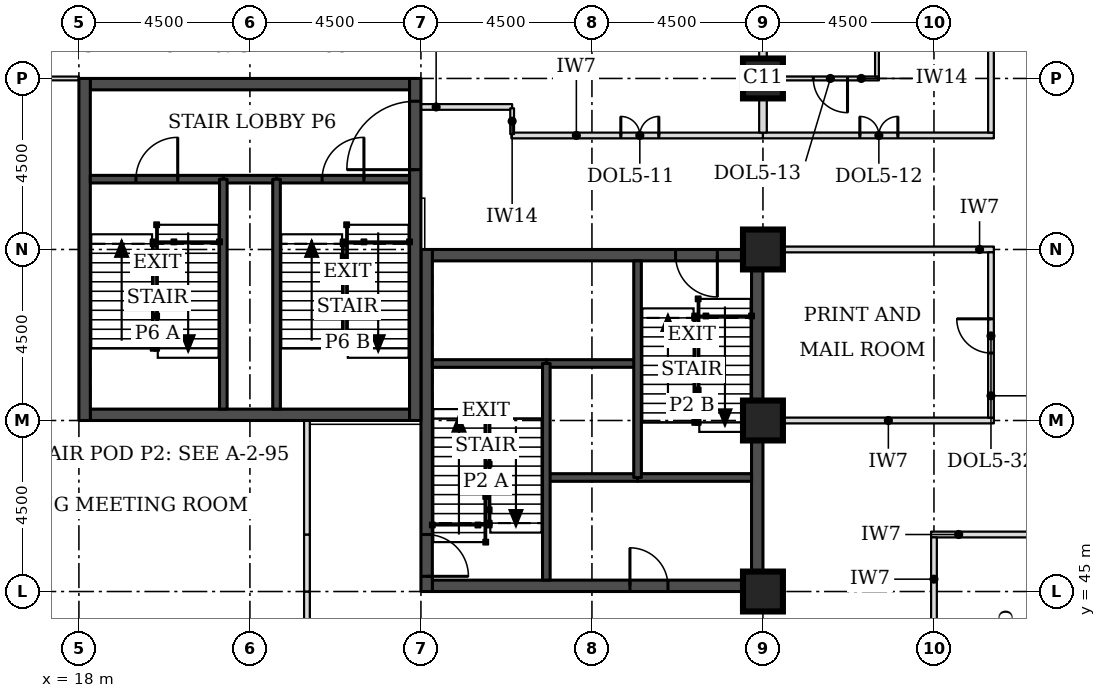
"""IFC4 building model, lengths in metres.
Left out: names, types, materials, properties, quantities, classifications, styles, units other than length and angle.
Written with IfcOpenShell. Run it as: python <this file> out.ifc"""

import sys

from ifc_helpers import new_model, si_unit, direction, frame, frame_2d, origin, origin_2d, place, context, subcontext, project, spatial, rectangle, extrude, element, fill, save


model = new_model("IFC4")
c1 = context("Model", 3, precision=1e-05, world=origin(), true_north=direction((0.0, 1.0)))
c2 = subcontext(c1, "Body", "Model", "MODEL_VIEW")
j1 = project(units=[si_unit("LENGTHUNIT", "METRE"), si_unit("PLANEANGLEUNIT", "RADIAN")], contexts=[c1])
p1 = place(None, origin())
s1 = spatial("IfcSite", under=j1, at=p1, CompositionType="ELEMENT")
p2 = place(p1, origin())
s2 = spatial("IfcBuilding", under=s1, at=p2, CompositionType="ELEMENT")
p3 = place(p2, frame((0.0, 0.0, 112.2)))
s3 = spatial("IfcBuildingStorey", under=s2, at=p3, CompositionType="ELEMENT", Elevation=112.2)
for number, where, z_axis, x_axis in (
    (1, (36.0, 45.0, 0.0), (0.0, 0.0, 1.0), (1.0, 0.0, 0.0)),
    (2, (36.0, 49.5, 0.0), (0.0, 0.0, 1.0), (1.0, 0.0, 0.0)),
    (3, (36.0, 54.0, 0.0), (0.0, 0.0, 1.0), (1.0, 0.0, 0.0)),
    (4, (36.0, 58.5, 0.0), (0.0, 0.0, 1.0), (1.0, 0.0, 0.0)),
):
    element("IfcColumn", number, at=place(p3, frame(where, z_axis=z_axis, x_axis=x_axis)), inside=s3, PredefinedType="COLUMN", context=c2, shape_type="SweptSolid", body=[
        extrude(rectangle(XDim=1.05, YDim=1.05, at=origin_2d()), origin(), (0.0, 0.0, 1.0), 3.7),
    ])
p4 = place(p3, frame((27.3, 45.15, 0.0), z_axis=(0.0, 0.0, 1.0), x_axis=(1.0, 0.0, 0.0)))
e5 = element("IfcWall", 5, at=p4, inside=s3, PredefinedType="SHEAR", context=c2, shape_type="SweptSolid", body=[
    extrude(rectangle(XDim=8.4, YDim=0.3, at=frame_2d((4.2, 0.0))), origin(), (0.0, 0.0, 1.0), 3.7),
])
p5 = place(p4, frame((5.2, 0.0, 0.0)))
e6 = element("IfcOpeningElement", 6, at=p5, cuts=e5, PredefinedType="OPENING", context=c2, shape_type="SweptSolid", body=[
    extrude(rectangle(XDim=1.0, YDim=2.1, at=frame_2d((0.5, 1.05))), frame((0.0, 0.16, 0.0), z_axis=(0.0, -1.0, 0.0), x_axis=(1.0, 0.0, 0.0)), (0.0, 0.0, 1.0), 0.32),
])
p6 = place(p3, frame((27.3, 53.85, 0.0), z_axis=(0.0, 0.0, 1.0), x_axis=(1.0, 0.0, 0.0)))
e7 = element("IfcWall", 7, at=p6, inside=s3, PredefinedType="SHEAR", context=c2, shape_type="SweptSolid", body=[
    extrude(rectangle(XDim=8.4, YDim=0.3, at=frame_2d((4.2, 0.0))), origin(), (0.0, 0.0, 1.0), 3.7),
])
p7 = place(p6, frame((6.4, 0.0, 0.0)))
e8 = element("IfcOpeningElement", 8, at=p7, cuts=e7, PredefinedType="OPENING", context=c2, shape_type="SweptSolid", body=[
    extrude(rectangle(XDim=1.1, YDim=2.1, at=frame_2d((0.55, 1.05))), frame((0.0, 0.16, 0.0), z_axis=(0.0, -1.0, 0.0), x_axis=(1.0, 0.0, 0.0)), (0.0, 0.0, 1.0), 0.32),
])
p8 = place(p3, frame((27.15, 45.0, 0.0), z_axis=(0.0, 0.0, 1.0), x_axis=(0.0, 1.0, 0.0)))
e9 = element("IfcWall", 9, at=p8, inside=s3, PredefinedType="SHEAR", context=c2, shape_type="SweptSolid", body=[
    extrude(rectangle(XDim=9.0, YDim=0.3, at=frame_2d((4.5, 0.0))), origin(), (0.0, 0.0, 1.0), 3.7),
])
p9 = place(p8, frame((0.4, 0.0, 0.0)))
e10 = element("IfcOpeningElement", 10, at=p9, cuts=e9, PredefinedType="OPENING", context=c2, shape_type="SweptSolid", body=[
    extrude(rectangle(XDim=1.1, YDim=2.1, at=frame_2d((0.55, 1.05))), frame((0.0, 0.16, 0.0), z_axis=(0.0, -1.0, 0.0), x_axis=(1.0, 0.0, 0.0)), (0.0, 0.0, 1.0), 0.32),
])
p10 = place(p3, frame((35.85, 45.0, 0.0), z_axis=(0.0, 0.0, 1.0), x_axis=(0.0, 1.0, 0.0)))
e11 = element("IfcWall", 11, at=p10, inside=s3, PredefinedType="SHEAR", context=c2, shape_type="SweptSolid", body=[
    extrude(rectangle(XDim=9.0, YDim=0.3, at=frame_2d((4.5, 0.0))), origin(), (0.0, 0.0, 1.0), 3.7),
])
for number, where, z_axis, x_axis in (
    (12, (18.3, 49.65, 0.0), (0.0, 0.0, 1.0), (1.0, 0.0, 0.0)),
    (13, (18.3, 58.35, 0.0), (0.0, 0.0, 1.0), (1.0, 0.0, 0.0)),
):
    element("IfcWall", number, at=place(p3, frame(where, z_axis=z_axis, x_axis=x_axis)), inside=s3, PredefinedType="SHEAR", context=c2, shape_type="SweptSolid", body=[
        extrude(rectangle(XDim=8.4, YDim=0.3, at=frame_2d((4.2, 0.0))), origin(), (0.0, 0.0, 1.0), 3.7),
    ])
p11 = place(p3, frame((18.15, 49.5, 0.0), z_axis=(0.0, 0.0, 1.0), x_axis=(0.0, 1.0, 0.0)))
e14 = element("IfcWall", 14, at=p11, inside=s3, PredefinedType="SHEAR", context=c2, shape_type="SweptSolid", body=[
    extrude(rectangle(XDim=9.0, YDim=0.3, at=frame_2d((4.5, 0.0))), origin(), (0.0, 0.0, 1.0), 3.7),
])
p12 = place(p3, frame((26.85, 49.5, 0.0), z_axis=(0.0, 0.0, 1.0), x_axis=(0.0, 1.0, 0.0)))
e15 = element("IfcWall", 15, at=p12, inside=s3, PredefinedType="SHEAR", context=c2, shape_type="SweptSolid", body=[
    extrude(rectangle(XDim=9.0, YDim=0.3, at=frame_2d((4.5, 0.0))), origin(), (0.0, 0.0, 1.0), 3.7),
])
p13 = place(p12, frame((6.6, 0.0, 0.0)))
e16 = element("IfcOpeningElement", 16, at=p13, cuts=e15, PredefinedType="OPENING", context=c2, shape_type="SweptSolid", body=[
    extrude(rectangle(XDim=1.8, YDim=2.1, at=frame_2d((0.9, 1.05))), frame((0.0, 0.16, 0.0), z_axis=(0.0, -1.0, 0.0), x_axis=(1.0, 0.0, 0.0)), (0.0, 0.0, 1.0), 0.32),
])
p14 = place(p3, frame((17.761, 63.751, 0.0), z_axis=(0.0, 0.0, 1.0), x_axis=(-0.707106781187, -0.707106781187, 0.0)))
e17 = element("IfcWall", 17, at=p14, inside=s3, PredefinedType="STANDARD", context=c2, shape_type="SweptSolid", body=[
    extrude(rectangle(XDim=7.089, YDim=0.35, at=frame_2d((3.544, 0.0))), origin(), (0.0, 0.0, 1.0), 3.525),
])
p15 = place(p14, frame((1.894, 0.0, 0.9)))
e18 = element("IfcOpeningElement", 18, at=p15, cuts=e17, PredefinedType="OPENING", context=c2, shape_type="SweptSolid", body=[
    extrude(rectangle(XDim=3.3, YDim=1.9, at=frame_2d((1.65, 0.95))), frame((0.0, 0.185, 0.0), z_axis=(0.0, -1.0, 0.0), x_axis=(1.0, 0.0, 0.0)), (0.0, 0.0, 1.0), 0.37),
])
p16 = place(p3, frame((12.749, 44.761, 0.0), z_axis=(0.0, 0.0, 1.0), x_axis=(0.707106781187, -0.707106781187, 0.0)))
e19 = element("IfcWall", 19, at=p16, inside=s3, PredefinedType="STANDARD", context=c2, shape_type="SweptSolid", body=[
    extrude(rectangle(XDim=7.089, YDim=0.35, at=frame_2d((3.544, 0.0))), origin(), (0.0, 0.0, 1.0), 3.525),
])
p17 = place(p16, frame((1.894, 0.0, 0.9)))
e20 = element("IfcOpeningElement", 20, at=p17, cuts=e19, PredefinedType="OPENING", context=c2, shape_type="SweptSolid", body=[
    extrude(rectangle(XDim=3.3, YDim=1.9, at=frame_2d((1.65, 0.95))), frame((0.0, 0.185, 0.0), z_axis=(0.0, -1.0, 0.0), x_axis=(1.0, 0.0, 0.0)), (0.0, 0.0, 1.0), 0.37),
])
p18 = place(p3, frame((40.425, 46.5, 0.0), z_axis=(0.0, 0.0, 1.0), x_axis=(1.0, 0.0, 0.0)))
e21 = element("IfcWall", 21, at=p18, inside=s3, PredefinedType="PARTITIONING", context=c2, shape_type="SweptSolid", body=[
    extrude(rectangle(XDim=4.65, YDim=0.15, at=frame_2d((2.325, 0.0))), origin(), (0.0, 0.0, 1.0), 3.55),
])
for number, where, z_axis, x_axis in (
    (22, (36.525, 49.5, 0.0), (0.0, 0.0, 1.0), (1.0, 0.0, 0.0)),
    (23, (36.525, 54.0, 0.0), (0.0, 0.0, 1.0), (1.0, 0.0, 0.0)),
):
    element("IfcWall", number, at=place(p3, frame(where, z_axis=z_axis, x_axis=x_axis)), inside=s3, PredefinedType="PARTITIONING", context=c2, shape_type="SweptSolid", body=[
        extrude(rectangle(XDim=5.55, YDim=0.15, at=frame_2d((2.775, 0.0))), origin(), (0.0, 0.0, 1.0), 3.55),
    ])
p19 = place(p3, frame((29.38, 57.0, 0.0), z_axis=(0.0, 0.0, 1.0), x_axis=(1.0, 0.0, 0.0)))
e24 = element("IfcWall", 24, at=p19, inside=s3, PredefinedType="PARTITIONING", context=c2, shape_type="SweptSolid", body=[
    extrude(rectangle(XDim=6.62, YDim=0.15, at=frame_2d((3.31, 0.0))), origin(), (0.0, 0.0, 1.0), 3.55),
])
p20 = place(p19, frame((2.88, 0.0, 0.0)))
e25 = element("IfcOpeningElement", 25, at=p20, cuts=e24, PredefinedType="OPENING", context=c2, shape_type="SweptSolid", body=[
    extrude(rectangle(XDim=1.0, YDim=2.1, at=frame_2d((0.5, 1.05))), frame((0.0, 0.085, 0.0), z_axis=(0.0, -1.0, 0.0), x_axis=(1.0, 0.0, 0.0)), (0.0, 0.0, 1.0), 0.17),
])
p21 = place(p3, frame((36.0, 57.0, 0.0), z_axis=(0.0, 0.0, 1.0), x_axis=(1.0, 0.0, 0.0)))
e26 = element("IfcWall", 26, at=p21, inside=s3, PredefinedType="PARTITIONING", context=c2, shape_type="SweptSolid", body=[
    extrude(rectangle(XDim=6.075, YDim=0.15, at=frame_2d((3.038, 0.0))), origin(), (0.0, 0.0, 1.0), 3.55),
])
p22 = place(p21, frame((2.55, 0.0, 0.0)))
e27 = element("IfcOpeningElement", 27, at=p22, cuts=e26, PredefinedType="OPENING", context=c2, shape_type="SweptSolid", body=[
    extrude(rectangle(XDim=1.0, YDim=2.1, at=frame_2d((0.5, 1.05))), frame((0.0, 0.085, 0.0), z_axis=(0.0, -1.0, 0.0), x_axis=(1.0, 0.0, 0.0)), (0.0, 0.0, 1.0), 0.17),
])
p23 = place(p3, frame((36.525, 58.5, 0.0), z_axis=(0.0, 0.0, 1.0), x_axis=(1.0, 0.0, 0.0)))
e28 = element("IfcWall", 28, at=p23, inside=s3, PredefinedType="PARTITIONING", context=c2, shape_type="SweptSolid", body=[
    extrude(rectangle(XDim=2.525, YDim=0.1, at=frame_2d((1.263, 0.0))), origin(), (0.0, 0.0, 1.0), 3.55),
])
p24 = place(p23, frame((0.8, 0.0, 0.0)))
e29 = element("IfcOpeningElement", 29, at=p24, cuts=e28, PredefinedType="OPENING", context=c2, shape_type="SweptSolid", body=[
    extrude(rectangle(XDim=0.9, YDim=2.1, at=frame_2d((0.45, 1.05))), frame((0.0, 0.06, 0.0), z_axis=(0.0, -1.0, 0.0), x_axis=(1.0, 0.0, 0.0)), (0.0, 0.0, 1.0), 0.12),
])
p25 = place(p3, frame((24.0, 39.975, 0.0), z_axis=(0.0, 0.0, 1.0), x_axis=(0.0, 1.0, 0.0)))
e30 = element("IfcWall", 30, at=p25, inside=s3, PredefinedType="PARTITIONING", context=c2, shape_type="SweptSolid", body=[
    extrude(rectangle(XDim=5.025, YDim=0.15, at=frame_2d((2.512, 0.0))), origin(), (0.0, 0.0, 1.0), 3.55),
])
p26 = place(p3, frame((40.5, 41.025, 0.0), z_axis=(0.0, 0.0, 1.0), x_axis=(0.0, 1.0, 0.0)))
e31 = element("IfcWall", 31, at=p26, inside=s3, PredefinedType="PARTITIONING", context=c2, shape_type="SweptSolid", body=[
    extrude(rectangle(XDim=5.4, YDim=0.15, at=frame_2d((2.7, 0.0))), origin(), (0.0, 0.0, 1.0), 3.55),
])
p27 = place(p26, frame((2.25, 0.0, 0.0)))
e32 = element("IfcOpeningElement", 32, at=p27, cuts=e31, PredefinedType="OPENING", context=c2, shape_type="SweptSolid", body=[
    extrude(rectangle(XDim=0.9, YDim=2.1, at=frame_2d((0.45, 1.05))), frame((0.0, 0.085, 0.0), z_axis=(0.0, -1.0, 0.0), x_axis=(1.0, 0.0, 0.0)), (0.0, 0.0, 1.0), 0.17),
])
p28 = place(p3, frame((24.0, 45.0, 0.0), z_axis=(0.0, 0.0, 1.0), x_axis=(0.0, 1.0, 0.0)))
e33 = element("IfcWall", 33, at=p28, inside=s3, PredefinedType="PARTITIONING", context=c2, shape_type="SweptSolid", body=[
    extrude(rectangle(XDim=1.5, YDim=0.15, at=frame_2d((0.75, 0.0))), origin(), (0.0, 0.0, 1.0), 3.55),
])
p29 = place(p3, frame((24.0, 46.5, 0.0), z_axis=(0.0, 0.0, 1.0), x_axis=(0.0, 1.0, 0.0)))
e34 = element("IfcWall", 34, at=p29, inside=s3, PredefinedType="PARTITIONING", context=c2, shape_type="SweptSolid", body=[
    extrude(rectangle(XDim=3.0, YDim=0.15, at=frame_2d((1.5, 0.0))), origin(), (0.0, 0.0, 1.0), 3.55),
])
p30 = place(p3, frame((42.0, 49.575, 0.0), z_axis=(0.0, 0.0, 1.0), x_axis=(0.0, 1.0, 0.0)))
e35 = element("IfcWall", 35, at=p30, inside=s3, PredefinedType="PARTITIONING", context=c2, shape_type="SweptSolid", body=[
    extrude(rectangle(XDim=4.35, YDim=0.15, at=frame_2d((2.175, 0.0))), origin(), (0.0, 0.0, 1.0), 3.55),
])
p31 = place(p30, frame((1.7, 0.0, 0.0)))
e36 = element("IfcOpeningElement", 36, at=p31, cuts=e35, PredefinedType="OPENING", context=c2, shape_type="SweptSolid", body=[
    extrude(rectangle(XDim=0.9, YDim=2.1, at=frame_2d((0.45, 1.05))), frame((0.0, 0.085, 0.0), z_axis=(0.0, -1.0, 0.0), x_axis=(1.0, 0.0, 0.0)), (0.0, 0.0, 1.0), 0.17),
])
p32 = place(p3, frame((36.0, 57.075, 0.0), z_axis=(0.0, 0.0, 1.0), x_axis=(0.0, 1.0, 0.0)))
e37 = element("IfcWall", 37, at=p32, inside=s3, PredefinedType="PARTITIONING", context=c2, shape_type="SweptSolid", body=[
    extrude(rectangle(XDim=0.9, YDim=0.2, at=frame_2d((0.45, 0.0))), origin(), (0.0, 0.0, 1.0), 2.8),
])
p33 = place(p3, frame((42.0, 57.075, 0.0), z_axis=(0.0, 0.0, 1.0), x_axis=(0.0, 1.0, 0.0)))
e38 = element("IfcWall", 38, at=p33, inside=s3, PredefinedType="PARTITIONING", context=c2, shape_type="SweptSolid", body=[
    extrude(rectangle(XDim=17.825, YDim=0.15, at=frame_2d((8.913, 0.0))), origin(), (0.0, 0.0, 1.0), 3.55),
])
p34 = place(p3, frame((39.0, 58.55, 0.0), z_axis=(0.0, 0.0, 1.0), x_axis=(0.0, 1.0, 0.0)))
e39 = element("IfcWall", 39, at=p34, inside=s3, PredefinedType="PARTITIONING", context=c2, shape_type="SweptSolid", body=[
    extrude(rectangle(XDim=4.45, YDim=0.1, at=frame_2d((2.225, 0.0))), origin(), (0.0, 0.0, 1.0), 3.55),
])
p35 = place(p3, frame((36.0, 58.995, 0.0), z_axis=(0.0, 0.0, 1.0), x_axis=(0.0, 1.0, 0.0)))
e40 = element("IfcWall", 40, at=p35, inside=s3, PredefinedType="PARTITIONING", context=c2, shape_type="SweptSolid", body=[
    extrude(rectangle(XDim=1.005, YDim=0.2, at=frame_2d((0.502, 0.0))), origin(), (0.0, 0.0, 1.0), 2.8),
])
p36 = place(p3, frame((13.5, 58.5, 0.0), z_axis=(0.0, 0.0, 1.0), x_axis=(1.0, 0.0, 0.0)))
e41 = element("IfcWall", 41, at=p36, inside=s3, PredefinedType="PARTITIONING", context=c2, shape_type="SweptSolid", body=[
    extrude(rectangle(XDim=4.5, YDim=0.1, at=frame_2d((2.25, 0.0))), origin(), (0.0, 0.0, 1.0), 2.55),
])
p37 = place(p36, frame((1.8, 0.0, 0.0)))
e42 = element("IfcOpeningElement", 42, at=p37, cuts=e41, PredefinedType="OPENING", context=c2, shape_type="SweptSolid", body=[
    extrude(rectangle(XDim=0.9, YDim=2.1, at=frame_2d((0.45, 1.05))), frame((0.0, 0.06, 0.0), z_axis=(0.0, -1.0, 0.0), x_axis=(1.0, 0.0, 0.0)), (0.0, 0.0, 1.0), 0.12),
])
p38 = place(p3, frame((27.0, 57.75, 0.0), z_axis=(0.0, 0.0, 1.0), x_axis=(1.0, 0.0, 0.0)))
e43 = element("IfcWall", 43, at=p38, inside=s3, PredefinedType="PARTITIONING", context=c2, shape_type="SweptSolid", body=[
    extrude(rectangle(XDim=2.4, YDim=0.15, at=frame_2d((1.2, 0.0))), origin(), (0.0, 0.0, 1.0), 3.55),
])
p39 = place(p3, frame((29.4, 57.715, 0.0), z_axis=(0.0, 0.0, 1.0), x_axis=(0.0, -1.0, 0.0)))
e44 = element("IfcWall", 44, at=p39, inside=s3, PredefinedType="PARTITIONING", context=c2, shape_type="SweptSolid", body=[
    extrude(rectangle(XDim=0.68, YDim=0.1, at=frame_2d((0.34, 0.0))), origin(), (0.0, 0.0, 1.0), 3.55),
])
p40 = place(p3, frame((30.3, 48.0, 0.0), z_axis=(0.0, 0.0, 1.0), x_axis=(1.0, 0.0, 0.0)))
e45 = element("IfcWall", 45, at=p40, inside=s3, PredefinedType="SOLIDWALL", context=c2, shape_type="SweptSolid", body=[
    extrude(rectangle(XDim=2.4, YDim=0.2, at=frame_2d((1.2, 0.0))), origin(), (0.0, 0.0, 1.0), 3.55),
])
p41 = place(p3, frame((32.7, 48.0, 0.0), z_axis=(0.0, 0.0, 1.0), x_axis=(1.0, 0.0, 0.0)))
e46 = element("IfcWall", 46, at=p41, inside=s3, PredefinedType="SOLIDWALL", context=c2, shape_type="SweptSolid", body=[
    extrude(rectangle(XDim=3.0, YDim=0.2, at=frame_2d((1.5, 0.0))), origin(), (0.0, 0.0, 1.0), 3.55),
])
p42 = place(p3, frame((30.3, 51.0, 0.0), z_axis=(0.0, 0.0, 1.0), x_axis=(1.0, 0.0, 0.0)))
e47 = element("IfcWall", 47, at=p42, inside=s3, PredefinedType="SOLIDWALL", context=c2, shape_type="SweptSolid", body=[
    extrude(rectangle(XDim=2.4, YDim=0.2, at=frame_2d((1.2, 0.0))), origin(), (0.0, 0.0, 1.0), 3.7),
])
p43 = place(p3, frame((27.3, 51.0, 0.0), z_axis=(0.0, 0.0, 1.0), x_axis=(1.0, 0.0, 0.0)))
e48 = element("IfcWall", 48, at=p43, inside=s3, PredefinedType="SOLIDWALL", context=c2, shape_type="SweptSolid", body=[
    extrude(rectangle(XDim=3.0, YDim=0.2, at=frame_2d((1.5, 0.0))), origin(), (0.0, 0.0, 1.0), 3.55),
])
for number, where, z_axis, x_axis in (
    (49, (30.3, 45.3, 0.0), (0.0, 0.0, 1.0), (0.0, 1.0, 0.0)),
    (50, (32.7, 48.0, 0.0), (0.0, 0.0, 1.0), (0.0, 1.0, 0.0)),
):
    element("IfcWall", number, at=place(p3, frame(where, z_axis=z_axis, x_axis=x_axis)), inside=s3, PredefinedType="SOLIDWALL", context=c2, shape_type="SweptSolid", body=[
        extrude(rectangle(XDim=5.7, YDim=0.2, at=frame_2d((2.85, 0.0))), origin(), (0.0, 0.0, 1.0), 3.55),
    ])
p44 = place(p3, frame((21.8, 55.85, 0.0), z_axis=(0.0, 0.0, 1.0), x_axis=(1.0, 0.0, 0.0)))
e51 = element("IfcWall", 51, at=p44, inside=s3, PredefinedType="SOLIDWALL", context=c2, shape_type="SweptSolid", body=[
    extrude(rectangle(XDim=1.4, YDim=0.2, at=frame_2d((0.7, 0.0))), origin(), (0.0, 0.0, 1.0), 3.55),
])
p45 = place(p3, frame((18.3, 55.85, 0.0), z_axis=(0.0, 0.0, 1.0), x_axis=(1.0, 0.0, 0.0)))
e52 = element("IfcWall", 52, at=p45, inside=s3, PredefinedType="SOLIDWALL", context=c2, shape_type="SweptSolid", body=[
    extrude(rectangle(XDim=3.5, YDim=0.2, at=frame_2d((1.75, 0.0))), origin(), (0.0, 0.0, 1.0), 3.55),
])
p46 = place(p45, frame((1.2, 0.0, 0.0)))
e53 = element("IfcOpeningElement", 53, at=p46, cuts=e52, PredefinedType="OPENING", context=c2, shape_type="SweptSolid", body=[
    extrude(rectangle(XDim=1.1, YDim=2.1, at=frame_2d((0.55, 1.05))), frame((0.0, 0.11, 0.0), z_axis=(0.0, -1.0, 0.0), x_axis=(1.0, 0.0, 0.0)), (0.0, 0.0, 1.0), 0.22),
])
p47 = place(p3, frame((23.2, 55.85, 0.0), z_axis=(0.0, 0.0, 1.0), x_axis=(1.0, 0.0, 0.0)))
e54 = element("IfcWall", 54, at=p47, inside=s3, PredefinedType="SOLIDWALL", context=c2, shape_type="SweptSolid", body=[
    extrude(rectangle(XDim=3.5, YDim=0.2, at=frame_2d((1.75, 0.0))), origin(), (0.0, 0.0, 1.0), 3.55),
])
p48 = place(p47, frame((1.2, 0.0, 0.0)))
e55 = element("IfcOpeningElement", 55, at=p48, cuts=e54, PredefinedType="OPENING", context=c2, shape_type="SweptSolid", body=[
    extrude(rectangle(XDim=1.1, YDim=2.1, at=frame_2d((0.55, 1.05))), frame((0.0, 0.11, 0.0), z_axis=(0.0, -1.0, 0.0), x_axis=(1.0, 0.0, 0.0)), (0.0, 0.0, 1.0), 0.22),
])
for number, where, z_axis, x_axis in (
    (56, (21.8, 49.8, 0.0), (0.0, 0.0, 1.0), (0.0, 1.0, 0.0)),
    (57, (23.2, 49.8, 0.0), (0.0, 0.0, 1.0), (0.0, 1.0, 0.0)),
):
    element("IfcWall", number, at=place(p3, frame(where, z_axis=z_axis, x_axis=x_axis)), inside=s3, PredefinedType="SOLIDWALL", context=c2, shape_type="SweptSolid", body=[
        extrude(rectangle(XDim=6.05, YDim=0.2, at=frame_2d((3.025, 0.0))), origin(), (0.0, 0.0, 1.0), 3.55),
    ])
p49 = place(p31, origin())
e58 = element("IfcDoor", 58, at=p49, inside=s3, OperationType="SINGLE_SWING_RIGHT", PredefinedType="DOOR", context=c2, shape_type="SweptSolid", body=[
    extrude(rectangle(XDim=0.9, YDim=2.1, at=frame_2d((0.45, 1.05))), frame((0.0, 0.025, 0.0), z_axis=(0.0, -1.0, 0.0), x_axis=(1.0, 0.0, 0.0)), (0.0, 0.0, 1.0), 0.05),
])
fill(e36, e58)
p50 = place(p22, origin())
e59 = element("IfcDoor", 59, at=p50, inside=s3, OperationType="DOUBLE_DOOR_SINGLE_SWING", PredefinedType="DOOR", context=c2, shape_type="SweptSolid", body=[
    extrude(rectangle(XDim=1.0, YDim=2.1, at=frame_2d((0.5, 1.05))), frame((0.0, 0.025, 0.0), z_axis=(0.0, -1.0, 0.0), x_axis=(1.0, 0.0, 0.0)), (0.0, 0.0, 1.0), 0.05),
])
fill(e27, e59)
p51 = place(p24, frame((0.9, 0.0, 0.0), z_axis=(0.0, 0.0, 1.0), x_axis=(-1.0, 0.0, 0.0)))
e60 = element("IfcDoor", 60, at=p51, inside=s3, OperationType="SINGLE_SWING_LEFT", PredefinedType="DOOR", context=c2, shape_type="SweptSolid", body=[
    extrude(rectangle(XDim=0.9, YDim=2.1, at=frame_2d((0.45, 1.05))), frame((0.0, 0.025, 0.0), z_axis=(0.0, -1.0, 0.0), x_axis=(1.0, 0.0, 0.0)), (0.0, 0.0, 1.0), 0.05),
])
fill(e29, e60)
p52 = place(p20, origin())
e61 = element("IfcDoor", 61, at=p52, inside=s3, OperationType="DOUBLE_DOOR_SINGLE_SWING", PredefinedType="DOOR", context=c2, shape_type="SweptSolid", body=[
    extrude(rectangle(XDim=1.0, YDim=2.1, at=frame_2d((0.5, 1.05))), frame((0.0, 0.025, 0.0), z_axis=(0.0, -1.0, 0.0), x_axis=(1.0, 0.0, 0.0)), (0.0, 0.0, 1.0), 0.05),
])
fill(e25, e61)
p53 = place(p9, frame((1.1, 0.0, 0.0), z_axis=(0.0, 0.0, 1.0), x_axis=(-1.0, 0.0, 0.0)))
e62 = element("IfcDoor", 62, at=p53, inside=s3, OperationType="SINGLE_SWING_RIGHT", PredefinedType="DOOR", context=c2, shape_type="SweptSolid", body=[
    extrude(rectangle(XDim=1.1, YDim=2.1, at=frame_2d((0.55, 1.05))), frame((0.0, 0.025, 0.0), z_axis=(0.0, -1.0, 0.0), x_axis=(1.0, 0.0, 0.0)), (0.0, 0.0, 1.0), 0.05),
])
fill(e10, e62)
p54 = place(p7, frame((1.1, 0.0, 0.0), z_axis=(0.0, 0.0, 1.0), x_axis=(-1.0, 0.0, 0.0)))
e63 = element("IfcDoor", 63, at=p54, inside=s3, OperationType="SINGLE_SWING_LEFT", PredefinedType="DOOR", context=c2, shape_type="SweptSolid", body=[
    extrude(rectangle(XDim=1.1, YDim=2.1, at=frame_2d((0.55, 1.05))), frame((0.0, 0.025, 0.0), z_axis=(0.0, -1.0, 0.0), x_axis=(1.0, 0.0, 0.0)), (0.0, 0.0, 1.0), 0.05),
])
fill(e8, e63)
p55 = place(p5, origin())
e64 = element("IfcDoor", 64, at=p55, inside=s3, OperationType="SINGLE_SWING_LEFT", PredefinedType="DOOR", context=c2, shape_type="SweptSolid", body=[
    extrude(rectangle(XDim=1.0, YDim=2.1, at=frame_2d((0.5, 1.05))), frame((0.0, 0.025, 0.0), z_axis=(0.0, -1.0, 0.0), x_axis=(1.0, 0.0, 0.0)), (0.0, 0.0, 1.0), 0.05),
])
fill(e6, e64)
p56 = place(p46, origin())
e65 = element("IfcDoor", 65, at=p56, inside=s3, OperationType="SINGLE_SWING_RIGHT", PredefinedType="DOOR", context=c2, shape_type="SweptSolid", body=[
    extrude(rectangle(XDim=1.1, YDim=2.1, at=frame_2d((0.55, 1.05))), frame((0.0, 0.025, 0.0), z_axis=(0.0, -1.0, 0.0), x_axis=(1.0, 0.0, 0.0)), (0.0, 0.0, 1.0), 0.05),
])
fill(e53, e65)
p57 = place(p48, origin())
e66 = element("IfcDoor", 66, at=p57, inside=s3, OperationType="SINGLE_SWING_RIGHT", PredefinedType="DOOR", context=c2, shape_type="SweptSolid", body=[
    extrude(rectangle(XDim=1.1, YDim=2.1, at=frame_2d((0.55, 1.05))), frame((0.0, 0.025, 0.0), z_axis=(0.0, -1.0, 0.0), x_axis=(1.0, 0.0, 0.0)), (0.0, 0.0, 1.0), 0.05),
])
fill(e55, e66)
p58 = place(p13, origin())
e67 = element("IfcDoor", 67, at=p58, inside=s3, OperationType="SINGLE_SWING_LEFT", PredefinedType="DOOR", context=c2, shape_type="SweptSolid", body=[
    extrude(rectangle(XDim=1.8, YDim=2.1, at=frame_2d((0.9, 1.05))), frame((0.0, 0.025, 0.0), z_axis=(0.0, -1.0, 0.0), x_axis=(1.0, 0.0, 0.0)), (0.0, 0.0, 1.0), 0.05),
])
fill(e16, e67)
save(model, sys.argv[1])
